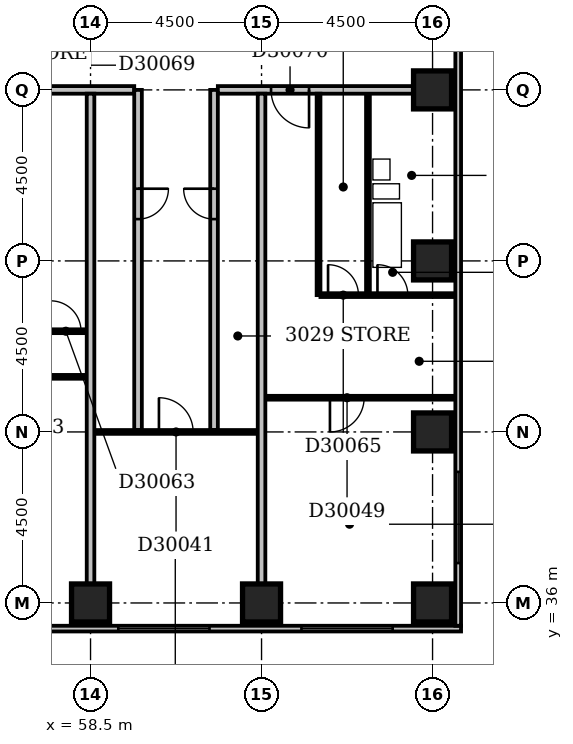
"""IFC4 building model, lengths in metres.
Left out: names, types, materials, properties, quantities, classifications, styles, units other than length and angle.
Written with IfcOpenShell. Run it as: python <this file> out.ifc"""

import sys

from ifc_helpers import new_model, si_unit, direction, frame, frame_2d, origin, origin_2d, place, context, subcontext, project, spatial, rectangle, extrude, element, fill, save


model = new_model("IFC4")
c1 = context("Model", 3, precision=1e-05, world=origin(), true_north=direction((0.0, 1.0)))
c2 = subcontext(c1, "Body", "Model", "MODEL_VIEW")
j1 = project(units=[si_unit("LENGTHUNIT", "METRE"), si_unit("PLANEANGLEUNIT", "RADIAN")], contexts=[c1])
p1 = place(None, origin())
s1 = spatial("IfcSite", under=j1, at=p1, CompositionType="ELEMENT")
p2 = place(p1, origin())
s2 = spatial("IfcBuilding", under=s1, at=p2, CompositionType="ELEMENT")
p3 = place(p2, frame((0.0, 0.0, 123.2)))
s3 = spatial("IfcBuildingStorey", under=s2, at=p3, CompositionType="ELEMENT", Elevation=123.2)
for number, where, z_axis, x_axis in (
    (1, (58.5, 36.0, -0.3), (0.0, 0.0, 1.0), (1.0, 0.0, 0.0)),
    (2, (63.0, 36.0, -0.3), (0.0, 0.0, 1.0), (1.0, 0.0, 0.0)),
    (3, (67.5, 36.0, -0.3), (0.0, 0.0, 1.0), (1.0, 0.0, 0.0)),
    (4, (67.5, 40.5, -0.3), (0.0, 0.0, 1.0), (1.0, 0.0, 0.0)),
    (5, (67.5, 45.0, -0.3), (0.0, 0.0, 1.0), (1.0, 0.0, 0.0)),
    (6, (67.5, 49.5, -0.3), (0.0, 0.0, 1.0), (1.0, 0.0, 0.0)),
):
    element("IfcColumn", number, at=place(p3, frame(where, z_axis=z_axis, x_axis=x_axis)), inside=s3, PredefinedType="COLUMN", context=c2, shape_type="SweptSolid", body=[
        extrude(rectangle(XDim=1.0, YDim=1.0, at=origin_2d()), origin(), (0.0, 0.0, 1.0), 3.6),
    ])
p4 = place(p3, frame((23.1, 35.325, 0.0), z_axis=(0.0, 0.0, 1.0), x_axis=(1.0, 0.0, 0.0)))
e7 = element("IfcWall", 7, at=p4, inside=s3, PredefinedType="STANDARD", context=c2, shape_type="SweptSolid", body=[
    extrude(rectangle(XDim=45.15, YDim=0.15, at=frame_2d((22.575, 0.0))), origin(), (0.0, 0.0, 1.0), 2.7),
])
p5 = place(p4, frame((0.45, 0.0, 0.6)))
e8 = element("IfcOpeningElement", 8, at=p5, cuts=e7, PredefinedType="OPENING", context=c2, shape_type="SweptSolid", body=[
    extrude(rectangle(XDim=2.4, YDim=1.8, at=frame_2d((1.2, 0.9))), frame((0.0, 0.087, 0.0), z_axis=(0.0, -1.0, 0.0), x_axis=(1.0, 0.0, 0.0)), (0.0, 0.0, 1.0), 0.174),
])
p6 = place(p4, frame((4.95, 0.0, 0.6)))
e9 = element("IfcOpeningElement", 9, at=p6, cuts=e7, PredefinedType="OPENING", context=c2, shape_type="SweptSolid", body=[
    extrude(rectangle(XDim=2.4, YDim=1.8, at=frame_2d((1.2, 0.9))), frame((0.0, 0.087, 0.0), z_axis=(0.0, -1.0, 0.0), x_axis=(1.0, 0.0, 0.0)), (0.0, 0.0, 1.0), 0.174),
])
p7 = place(p4, frame((10.598, 0.0, 0.6)))
e10 = element("IfcOpeningElement", 10, at=p7, cuts=e7, PredefinedType="OPENING", context=c2, shape_type="SweptSolid", body=[
    extrude(rectangle(XDim=1.5, YDim=1.8, at=frame_2d((0.75, 0.9))), frame((0.0, 0.087, 0.0), z_axis=(0.0, -1.0, 0.0), x_axis=(1.0, 0.0, 0.0)), (0.0, 0.0, 1.0), 0.174),
])
p8 = place(p4, frame((13.66, 0.0, 0.6)))
e11 = element("IfcOpeningElement", 11, at=p8, cuts=e7, PredefinedType="OPENING", context=c2, shape_type="SweptSolid", body=[
    extrude(rectangle(XDim=1.8, YDim=1.8, at=frame_2d((0.9, 0.9))), frame((0.0, 0.087, 0.0), z_axis=(0.0, -1.0, 0.0), x_axis=(1.0, 0.0, 0.0)), (0.0, 0.0, 1.0), 0.174),
])
p9 = place(p4, frame((18.45, 0.0, 0.6)))
e12 = element("IfcOpeningElement", 12, at=p9, cuts=e7, PredefinedType="OPENING", context=c2, shape_type="SweptSolid", body=[
    extrude(rectangle(XDim=2.4, YDim=1.8, at=frame_2d((1.2, 0.9))), frame((0.0, 0.087, 0.0), z_axis=(0.0, -1.0, 0.0), x_axis=(1.0, 0.0, 0.0)), (0.0, 0.0, 1.0), 0.174),
])
p10 = place(p4, frame((22.95, 0.0, 0.6)))
e13 = element("IfcOpeningElement", 13, at=p10, cuts=e7, PredefinedType="OPENING", context=c2, shape_type="SweptSolid", body=[
    extrude(rectangle(XDim=2.4, YDim=1.8, at=frame_2d((1.2, 0.9))), frame((0.0, 0.087, 0.0), z_axis=(0.0, -1.0, 0.0), x_axis=(1.0, 0.0, 0.0)), (0.0, 0.0, 1.0), 0.174),
])
p11 = place(p4, frame((27.45, 0.0, 0.6)))
e14 = element("IfcOpeningElement", 14, at=p11, cuts=e7, PredefinedType="OPENING", context=c2, shape_type="SweptSolid", body=[
    extrude(rectangle(XDim=2.4, YDim=1.8, at=frame_2d((1.2, 0.9))), frame((0.0, 0.087, 0.0), z_axis=(0.0, -1.0, 0.0), x_axis=(1.0, 0.0, 0.0)), (0.0, 0.0, 1.0), 0.174),
])
p12 = place(p4, frame((31.95, 0.0, 0.6)))
e15 = element("IfcOpeningElement", 15, at=p12, cuts=e7, PredefinedType="OPENING", context=c2, shape_type="SweptSolid", body=[
    extrude(rectangle(XDim=2.4, YDim=1.8, at=frame_2d((1.2, 0.9))), frame((0.0, 0.087, 0.0), z_axis=(0.0, -1.0, 0.0), x_axis=(1.0, 0.0, 0.0)), (0.0, 0.0, 1.0), 0.174),
])
p13 = place(p4, frame((36.131, 0.0, 0.6)))
e16 = element("IfcOpeningElement", 16, at=p13, cuts=e7, PredefinedType="OPENING", context=c2, shape_type="SweptSolid", body=[
    extrude(rectangle(XDim=2.4, YDim=1.8, at=frame_2d((1.2, 0.9))), frame((0.0, 0.087, 0.0), z_axis=(0.0, -1.0, 0.0), x_axis=(1.0, 0.0, 0.0)), (0.0, 0.0, 1.0), 0.174),
])
p14 = place(p4, frame((40.95, 0.0, 0.6)))
e17 = element("IfcOpeningElement", 17, at=p14, cuts=e7, PredefinedType="OPENING", context=c2, shape_type="SweptSolid", body=[
    extrude(rectangle(XDim=2.4, YDim=1.8, at=frame_2d((1.2, 0.9))), frame((0.0, 0.087, 0.0), z_axis=(0.0, -1.0, 0.0), x_axis=(1.0, 0.0, 0.0)), (0.0, 0.0, 1.0), 0.174),
])
p15 = place(p3, frame((68.175, 35.4, 0.0), z_axis=(0.0, 0.0, 1.0), x_axis=(0.0, 1.0, 0.0)))
e18 = element("IfcWall", 18, at=p15, inside=s3, PredefinedType="STANDARD", context=c2, shape_type="SweptSolid", body=[
    extrude(rectangle(XDim=23.85, YDim=0.15, at=frame_2d((11.925, 0.0))), origin(), (0.0, 0.0, 1.0), 2.7),
])
p16 = place(p15, frame((1.65, 0.0, 0.6)))
e19 = element("IfcOpeningElement", 19, at=p16, cuts=e18, PredefinedType="OPENING", context=c2, shape_type="SweptSolid", body=[
    extrude(rectangle(XDim=2.4, YDim=1.8, at=frame_2d((1.2, 0.9))), frame((0.0, 0.087, 0.0), z_axis=(0.0, -1.0, 0.0), x_axis=(1.0, 0.0, 0.0)), (0.0, 0.0, 1.0), 0.174),
])
p17 = place(p15, frame((19.65, 0.0, 0.6)))
e20 = element("IfcOpeningElement", 20, at=p17, cuts=e18, PredefinedType="OPENING", context=c2, shape_type="SweptSolid", body=[
    extrude(rectangle(XDim=2.4, YDim=1.8, at=frame_2d((1.2, 0.9))), frame((0.0, 0.087, 0.0), z_axis=(0.0, -1.0, 0.0), x_axis=(1.0, 0.0, 0.0)), (0.0, 0.0, 1.0), 0.174),
])
p18 = place(p3, frame((58.5, 36.5, 0.0), z_axis=(0.0, 0.0, 1.0), x_axis=(0.0, 1.0, 0.0)))
e21 = element("IfcWall", 21, at=p18, inside=s3, PredefinedType="PARTITIONING", context=c2, shape_type="SweptSolid", body=[
    extrude(rectangle(XDim=12.9, YDim=0.2, at=frame_2d((6.45, 0.0))), origin(), (0.0, 0.0, 1.0), 3.3),
])
p19 = place(p3, frame((63.0, 36.5, 0.0), z_axis=(0.0, 0.0, 1.0), x_axis=(0.0, 1.0, 0.0)))
e22 = element("IfcWall", 22, at=p19, inside=s3, PredefinedType="PARTITIONING", context=c2, shape_type="SweptSolid", body=[
    extrude(rectangle(XDim=12.9, YDim=0.2, at=frame_2d((6.45, 0.0))), origin(), (0.0, 0.0, 1.0), 2.4),
])
p20 = place(p3, frame((58.6, 40.5, 0.0), z_axis=(0.0, 0.0, 1.0), x_axis=(1.0, 0.0, 0.0)))
e23 = element("IfcWall", 23, at=p20, inside=s3, PredefinedType="PARTITIONING", context=c2, shape_type="SweptSolid", body=[
    extrude(rectangle(XDim=4.3, YDim=0.1, at=frame_2d((2.15, 0.0))), origin(), (0.0, 0.0, 1.0), 3.3),
])
p21 = place(p20, frame((1.7, 0.0, 0.0)))
e24 = element("IfcOpeningElement", 24, at=p21, cuts=e23, PredefinedType="OPENING", context=c2, shape_type="SweptSolid", body=[
    extrude(rectangle(XDim=0.9, YDim=2.1, at=frame_2d((0.45, 1.05))), frame((0.0, 0.062, 0.0), z_axis=(0.0, -1.0, 0.0), x_axis=(1.0, 0.0, 0.0)), (0.0, 0.0, 1.0), 0.124),
])
p22 = place(p3, frame((59.75, 40.55, 0.0), z_axis=(0.0, 0.0, 1.0), x_axis=(0.0, 1.0, 0.0)))
e25 = element("IfcWall", 25, at=p22, inside=s3, PredefinedType="PARTITIONING", context=c2, shape_type="SweptSolid", body=[
    extrude(rectangle(XDim=8.95, YDim=0.2, at=frame_2d((4.475, 0.0))), origin(), (0.0, 0.0, 1.0), 3.3),
])
p23 = place(p22, frame((5.55, 0.0, 0.0)))
e26 = element("IfcOpeningElement", 26, at=p23, cuts=e25, PredefinedType="OPENING", context=c2, shape_type="SweptSolid", body=[
    extrude(rectangle(XDim=0.8, YDim=2.1, at=frame_2d((0.4, 1.05))), frame((0.0, 0.112, 0.0), z_axis=(0.0, -1.0, 0.0), x_axis=(1.0, 0.0, 0.0)), (0.0, 0.0, 1.0), 0.224),
])
p24 = place(p3, frame((61.75, 40.55, 0.0), z_axis=(0.0, 0.0, 1.0), x_axis=(0.0, 1.0, 0.0)))
e27 = element("IfcWall", 27, at=p24, inside=s3, PredefinedType="PARTITIONING", context=c2, shape_type="SweptSolid", body=[
    extrude(rectangle(XDim=8.95, YDim=0.2, at=frame_2d((4.475, 0.0))), origin(), (0.0, 0.0, 1.0), 3.3),
])
p25 = place(p24, frame((5.55, 0.0, 0.0)))
e28 = element("IfcOpeningElement", 28, at=p25, cuts=e27, PredefinedType="OPENING", context=c2, shape_type="SweptSolid", body=[
    extrude(rectangle(XDim=0.8, YDim=2.1, at=frame_2d((0.4, 1.05))), frame((0.0, 0.112, 0.0), z_axis=(0.0, -1.0, 0.0), x_axis=(1.0, 0.0, 0.0)), (0.0, 0.0, 1.0), 0.224),
])
p26 = place(p3, frame((63.1, 41.4, 0.0), z_axis=(0.0, 0.0, 1.0), x_axis=(1.0, 0.0, 0.0)))
e29 = element("IfcWall", 29, at=p26, inside=s3, PredefinedType="PARTITIONING", context=c2, shape_type="SweptSolid", body=[
    extrude(rectangle(XDim=5.0, YDim=0.1, at=frame_2d((2.5, 0.0))), origin(), (0.0, 0.0, 1.0), 3.3),
])
p27 = place(p26, frame((1.7, 0.0, 0.0)))
e30 = element("IfcOpeningElement", 30, at=p27, cuts=e29, PredefinedType="OPENING", context=c2, shape_type="SweptSolid", body=[
    extrude(rectangle(XDim=0.9, YDim=2.1, at=frame_2d((0.45, 1.05))), frame((0.0, 0.062, 0.0), z_axis=(0.0, -1.0, 0.0), x_axis=(1.0, 0.0, 0.0)), (0.0, 0.0, 1.0), 0.124),
])
p28 = place(p3, frame((54.1, 41.95, 0.0), z_axis=(0.0, 0.0, 1.0), x_axis=(1.0, 0.0, 0.0)))
e31 = element("IfcWall", 31, at=p28, inside=s3, PredefinedType="PARTITIONING", context=c2, shape_type="SweptSolid", body=[
    extrude(rectangle(XDim=4.3, YDim=0.1, at=frame_2d((2.15, 0.0))), origin(), (0.0, 0.0, 1.0), 3.3),
])
p29 = place(p28, frame((1.7, 0.0, 0.0)))
e32 = element("IfcOpeningElement", 32, at=p29, cuts=e31, PredefinedType="OPENING", context=c2, shape_type="SweptSolid", body=[
    extrude(rectangle(XDim=0.9, YDim=2.1, at=frame_2d((0.45, 1.05))), frame((0.0, 0.062, 0.0), z_axis=(0.0, -1.0, 0.0), x_axis=(1.0, 0.0, 0.0)), (0.0, 0.0, 1.0), 0.124),
])
p30 = place(p3, frame((57.25, 43.15, 0.0), z_axis=(0.0, 0.0, 1.0), x_axis=(1.0, 0.0, 0.0)))
e33 = element("IfcWall", 33, at=p30, inside=s3, PredefinedType="PARTITIONING", context=c2, shape_type="SweptSolid", body=[
    extrude(rectangle(XDim=1.15, YDim=0.1, at=frame_2d((0.575, 0.0))), origin(), (0.0, 0.0, 1.0), 3.3),
])
p31 = place(p30, frame((0.2, 0.0, 0.0)))
e34 = element("IfcOpeningElement", 34, at=p31, cuts=e33, PredefinedType="OPENING", context=c2, shape_type="SweptSolid", body=[
    extrude(rectangle(XDim=0.8, YDim=2.1, at=frame_2d((0.4, 1.05))), frame((0.0, 0.062, 0.0), z_axis=(0.0, -1.0, 0.0), x_axis=(1.0, 0.0, 0.0)), (0.0, 0.0, 1.0), 0.124),
])
p32 = place(p3, frame((64.5, 44.1, 0.0), z_axis=(0.0, 0.0, 1.0), x_axis=(0.0, 1.0, 0.0)))
e35 = element("IfcWall", 35, at=p32, inside=s3, PredefinedType="PARTITIONING", context=c2, shape_type="SweptSolid", body=[
    extrude(rectangle(XDim=5.3, YDim=0.1, at=frame_2d((2.65, 0.0))), origin(), (0.0, 0.0, 1.0), 3.3),
])
p33 = place(p3, frame((64.55, 44.1, 0.0), z_axis=(0.0, 0.0, 1.0), x_axis=(1.0, 0.0, 0.0)))
e36 = element("IfcWall", 36, at=p33, inside=s3, PredefinedType="PARTITIONING", context=c2, shape_type="SweptSolid", body=[
    extrude(rectangle(XDim=3.55, YDim=0.1, at=frame_2d((1.775, 0.0))), origin(), (0.0, 0.0, 1.0), 3.3),
])
p34 = place(p33, frame((1.5, 0.0, 0.0)))
e37 = element("IfcOpeningElement", 37, at=p34, cuts=e36, PredefinedType="OPENING", context=c2, shape_type="SweptSolid", body=[
    extrude(rectangle(XDim=0.8, YDim=2.1, at=frame_2d((0.4, 1.05))), frame((0.0, 0.062, 0.0), z_axis=(0.0, -1.0, 0.0), x_axis=(1.0, 0.0, 0.0)), (0.0, 0.0, 1.0), 0.124),
])
p35 = place(p33, frame((0.2, 0.0, 0.0)))
e38 = element("IfcOpeningElement", 38, at=p35, cuts=e36, PredefinedType="OPENING", context=c2, shape_type="SweptSolid", body=[
    extrude(rectangle(XDim=0.8, YDim=2.1, at=frame_2d((0.4, 1.05))), frame((0.0, 0.062, 0.0), z_axis=(0.0, -1.0, 0.0), x_axis=(1.0, 0.0, 0.0)), (0.0, 0.0, 1.0), 0.124),
])
p36 = place(p3, frame((65.8, 44.15, 0.0), z_axis=(0.0, 0.0, 1.0), x_axis=(0.0, 1.0, 0.0)))
e39 = element("IfcWall", 39, at=p36, inside=s3, PredefinedType="PLUMBINGWALL", context=c2, shape_type="SweptSolid", body=[
    extrude(rectangle(XDim=5.25, YDim=0.1, at=frame_2d((2.625, 0.0))), origin(), (0.0, 0.0, 1.0), 3.3),
])
p37 = place(p3, frame((52.85, 49.5, 0.0), z_axis=(0.0, 0.0, 1.0), x_axis=(1.0, 0.0, 0.0)))
e40 = element("IfcWall", 40, at=p37, inside=s3, PredefinedType="PARTITIONING", context=c2, shape_type="SweptSolid", body=[
    extrude(rectangle(XDim=6.8, YDim=0.2, at=frame_2d((3.4, 0.0))), origin(), (0.0, 0.0, 1.0), 3.3),
])
p38 = place(p37, frame((3.1, 0.0, 0.0)))
e41 = element("IfcOpeningElement", 41, at=p38, cuts=e40, PredefinedType="OPENING", context=c2, shape_type="SweptSolid", body=[
    extrude(rectangle(XDim=1.0, YDim=2.1, at=frame_2d((0.5, 1.05))), frame((0.0, 0.112, 0.0), z_axis=(0.0, -1.0, 0.0), x_axis=(1.0, 0.0, 0.0)), (0.0, 0.0, 1.0), 0.224),
])
p39 = place(p3, frame((61.85, 49.5, 0.0), z_axis=(0.0, 0.0, 1.0), x_axis=(1.0, 0.0, 0.0)))
e42 = element("IfcWall", 42, at=p39, inside=s3, PredefinedType="PARTITIONING", context=c2, shape_type="SweptSolid", body=[
    extrude(rectangle(XDim=5.15, YDim=0.2, at=frame_2d((2.575, 0.0))), origin(), (0.0, 0.0, 1.0), 3.3),
])
p40 = place(p39, frame((1.4, 0.0, 0.0)))
e43 = element("IfcOpeningElement", 43, at=p40, cuts=e42, PredefinedType="OPENING", context=c2, shape_type="SweptSolid", body=[
    extrude(rectangle(XDim=1.0, YDim=2.1, at=frame_2d((0.5, 1.05))), frame((0.0, 0.112, 0.0), z_axis=(0.0, -1.0, 0.0), x_axis=(1.0, 0.0, 0.0)), (0.0, 0.0, 1.0), 0.224),
])
p41 = place(p13, origin())
e44 = element("IfcWindow", 44, at=p41, inside=s3, PartitioningType="SINGLE_PANEL", PredefinedType="WINDOW", context=c2, shape_type="SweptSolid", body=[
    extrude(rectangle(XDim=2.4, YDim=1.8, at=frame_2d((1.2, 0.9))), frame((0.0, 0.03, 0.0), z_axis=(0.0, -1.0, 0.0), x_axis=(1.0, 0.0, 0.0)), (0.0, 0.0, 1.0), 0.06),
])
fill(e16, e44)
p42 = place(p14, origin())
e45 = element("IfcWindow", 45, at=p42, inside=s3, PartitioningType="SINGLE_PANEL", PredefinedType="WINDOW", context=c2, shape_type="SweptSolid", body=[
    extrude(rectangle(XDim=2.4, YDim=1.8, at=frame_2d((1.2, 0.9))), frame((0.0, 0.03, 0.0), z_axis=(0.0, -1.0, 0.0), x_axis=(1.0, 0.0, 0.0)), (0.0, 0.0, 1.0), 0.06),
])
fill(e17, e45)
p43 = place(p16, origin())
e46 = element("IfcWindow", 46, at=p43, inside=s3, PartitioningType="SINGLE_PANEL", PredefinedType="WINDOW", context=c2, shape_type="SweptSolid", body=[
    extrude(rectangle(XDim=2.4, YDim=1.8, at=frame_2d((1.2, 0.9))), frame((0.0, 0.03, 0.0), z_axis=(0.0, -1.0, 0.0), x_axis=(1.0, 0.0, 0.0)), (0.0, 0.0, 1.0), 0.06),
])
fill(e19, e46)
p44 = place(p21, origin())
e47 = element("IfcDoor", 47, at=p44, inside=s3, OperationType="SINGLE_SWING_LEFT", PredefinedType="DOOR", context=c2, shape_type="SweptSolid", body=[
    extrude(rectangle(XDim=0.9, YDim=2.1, at=frame_2d((0.45, 1.05))), frame((0.0, 0.025, 0.0), z_axis=(0.0, -1.0, 0.0), x_axis=(1.0, 0.0, 0.0)), (0.0, 0.0, 1.0), 0.05),
])
fill(e24, e47)
p45 = place(p23, origin())
e48 = element("IfcDoor", 48, at=p45, inside=s3, OperationType="SINGLE_SWING_RIGHT", PredefinedType="DOOR", context=c2, shape_type="SweptSolid", body=[
    extrude(rectangle(XDim=0.8, YDim=2.1, at=frame_2d((0.4, 1.05))), frame((0.0, 0.025, 0.0), z_axis=(0.0, -1.0, 0.0), x_axis=(1.0, 0.0, 0.0)), (0.0, 0.0, 1.0), 0.05),
])
fill(e26, e48)
p46 = place(p25, frame((0.8, 0.0, 0.0), z_axis=(0.0, 0.0, 1.0), x_axis=(-1.0, 0.0, 0.0)))
e49 = element("IfcDoor", 49, at=p46, inside=s3, OperationType="SINGLE_SWING_LEFT", PredefinedType="DOOR", context=c2, shape_type="SweptSolid", body=[
    extrude(rectangle(XDim=0.8, YDim=2.1, at=frame_2d((0.4, 1.05))), frame((0.0, 0.025, 0.0), z_axis=(0.0, -1.0, 0.0), x_axis=(1.0, 0.0, 0.0)), (0.0, 0.0, 1.0), 0.05),
])
fill(e28, e49)
p47 = place(p27, frame((0.9, 0.0, 0.0), z_axis=(0.0, 0.0, 1.0), x_axis=(-1.0, 0.0, 0.0)))
e50 = element("IfcDoor", 50, at=p47, inside=s3, OperationType="SINGLE_SWING_RIGHT", PredefinedType="DOOR", context=c2, shape_type="SweptSolid", body=[
    extrude(rectangle(XDim=0.9, YDim=2.1, at=frame_2d((0.45, 1.05))), frame((0.0, 0.025, 0.0), z_axis=(0.0, -1.0, 0.0), x_axis=(1.0, 0.0, 0.0)), (0.0, 0.0, 1.0), 0.05),
])
fill(e30, e50)
p48 = place(p31, origin())
e51 = element("IfcDoor", 51, at=p48, inside=s3, OperationType="SINGLE_SWING_LEFT", PredefinedType="DOOR", context=c2, shape_type="SweptSolid", body=[
    extrude(rectangle(XDim=0.8, YDim=2.1, at=frame_2d((0.4, 1.05))), frame((0.0, 0.025, 0.0), z_axis=(0.0, -1.0, 0.0), x_axis=(1.0, 0.0, 0.0)), (0.0, 0.0, 1.0), 0.05),
])
fill(e34, e51)
p49 = place(p34, origin())
e52 = element("IfcDoor", 52, at=p49, inside=s3, OperationType="SINGLE_SWING_LEFT", PredefinedType="DOOR", context=c2, shape_type="SweptSolid", body=[
    extrude(rectangle(XDim=0.8, YDim=2.1, at=frame_2d((0.4, 1.05))), frame((0.0, 0.025, 0.0), z_axis=(0.0, -1.0, 0.0), x_axis=(1.0, 0.0, 0.0)), (0.0, 0.0, 1.0), 0.05),
])
fill(e37, e52)
p50 = place(p35, origin())
e53 = element("IfcDoor", 53, at=p50, inside=s3, OperationType="SINGLE_SWING_LEFT", PredefinedType="DOOR", context=c2, shape_type="SweptSolid", body=[
    extrude(rectangle(XDim=0.8, YDim=2.1, at=frame_2d((0.4, 1.05))), frame((0.0, 0.025, 0.0), z_axis=(0.0, -1.0, 0.0), x_axis=(1.0, 0.0, 0.0)), (0.0, 0.0, 1.0), 0.05),
])
fill(e38, e53)
p51 = place(p40, origin())
e54 = element("IfcDoor", 54, at=p51, inside=s3, OperationType="SINGLE_SWING_RIGHT", PredefinedType="DOOR", context=c2, shape_type="SweptSolid", body=[
    extrude(rectangle(XDim=1.0, YDim=2.1, at=frame_2d((0.5, 1.05))), frame((0.0, 0.025, 0.0), z_axis=(0.0, -1.0, 0.0), x_axis=(1.0, 0.0, 0.0)), (0.0, 0.0, 1.0), 0.05),
])
fill(e43, e54)
save(model, sys.argv[1])
